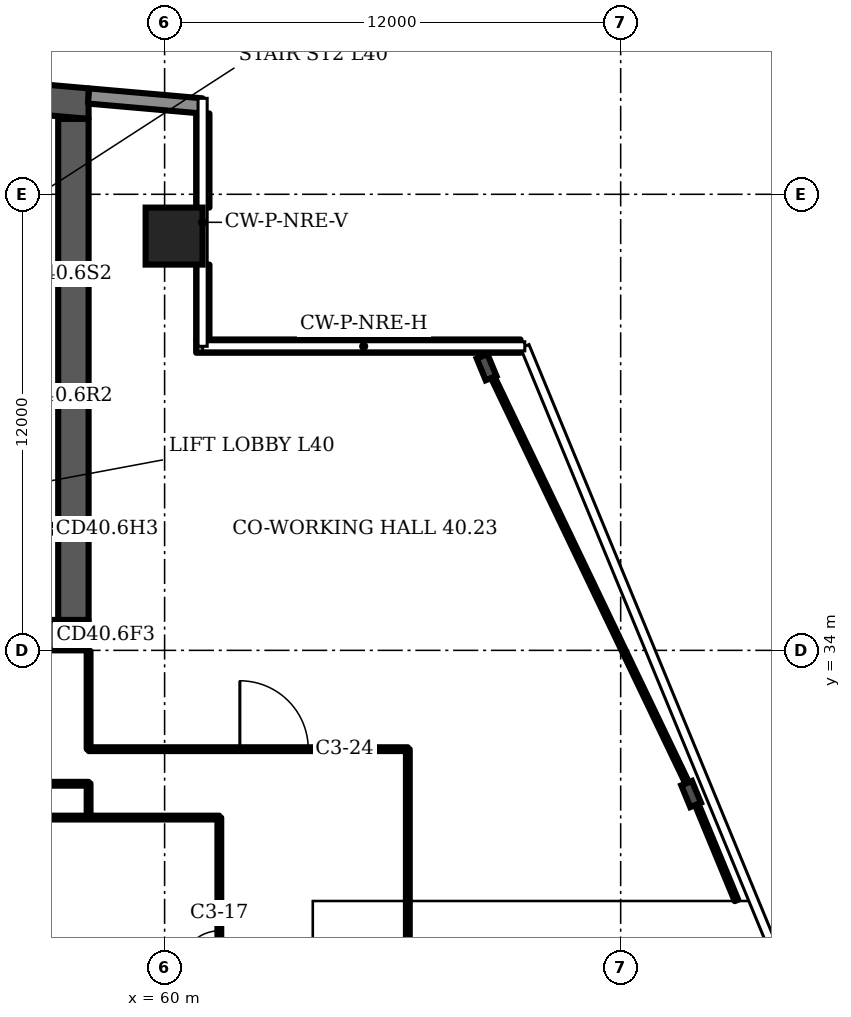
"""IFC4 building model, lengths in metres.
Left out: names, types, materials, properties, quantities, classifications, styles, units other than length and angle.
Written with IfcOpenShell. Run it as: python <this file> out.ifc"""

import sys

from ifc_helpers import new_model, si_unit, direction, frame, frame_2d, origin, origin_2d, place, context, subcontext, project, spatial, polyline, rectangle, i_section, outline, extrude, element, fill, save


model = new_model("IFC4")
c1 = context("Model", 3, precision=1e-05, world=origin(), true_north=direction((0.0, 1.0)))
c2 = subcontext(c1, "Body", "Model", "MODEL_VIEW")
j1 = project(units=[si_unit("LENGTHUNIT", "METRE"), si_unit("PLANEANGLEUNIT", "RADIAN")], contexts=[c1])
p1 = place(None, origin())
s1 = spatial("IfcSite", under=j1, at=p1, CompositionType="ELEMENT")
p2 = place(p1, origin())
s2 = spatial("IfcBuilding", under=s1, at=p2, CompositionType="ELEMENT")
p3 = place(p2, frame((0.0, 0.0, 166.3)))
s3 = spatial("IfcBuildingStorey", under=s2, at=p3, CompositionType="ELEMENT", Elevation=166.3)
p4 = place(p3, frame((0.0, 0.0, -0.0)))
e1 = element("IfcWall", 1, at=p4, inside=s3, PredefinedType="SHEAR", context=c2, shape_type="SweptSolid", body=[
    extrude(outline(polyline([(16.0, 47.984), (37.0, 49.822), (58.0, 47.984), (58.0, 48.787), (37.0, 50.625), (16.0, 48.787), (16.0, 47.984)])), origin(), (0.0, 0.0, 1.0), 3.6),
])
p5 = place(p3, frame((16.0, 34.4, 0.0), z_axis=(0.0, 0.0, 1.0), x_axis=(1.0, 0.0, 0.0)))
e2 = element("IfcWall", 2, at=p5, inside=s3, PredefinedType="SHEAR", context=c2, shape_type="SweptSolid", body=[
    extrude(rectangle(XDim=42.0, YDim=0.8, at=frame_2d((21.0, 0.0))), origin(), (0.0, 0.0, 1.0), 3.6),
])
p6 = place(p5, frame((3.2, 0.0, 0.0)))
e3 = element("IfcOpeningElement", 3, at=p6, cuts=e2, PredefinedType="OPENING", context=c2, shape_type="SweptSolid", body=[
    extrude(rectangle(XDim=1.0, YDim=2.1, at=frame_2d((0.5, 1.05))), frame((0.0, 0.41, 0.0), z_axis=(0.0, -1.0, 0.0), x_axis=(1.0, 0.0, 0.0)), (0.0, 0.0, 1.0), 0.82),
])
p7 = place(p5, frame((7.65, 0.0, 0.0)))
e4 = element("IfcOpeningElement", 4, at=p7, cuts=e2, PredefinedType="OPENING", context=c2, shape_type="SweptSolid", body=[
    extrude(rectangle(XDim=1.2, YDim=2.1, at=frame_2d((0.6, 1.05))), frame((0.0, 0.41, 0.0), z_axis=(0.0, -1.0, 0.0), x_axis=(1.0, 0.0, 0.0)), (0.0, 0.0, 1.0), 0.82),
])
p8 = place(p5, frame((14.767, 0.0, 0.0)))
e5 = element("IfcOpeningElement", 5, at=p8, cuts=e2, PredefinedType="OPENING", context=c2, shape_type="SweptSolid", body=[
    extrude(rectangle(XDim=1.1, YDim=2.1, at=frame_2d((0.55, 1.05))), frame((0.0, 0.41, 0.0), z_axis=(0.0, -1.0, 0.0), x_axis=(1.0, 0.0, 0.0)), (0.0, 0.0, 1.0), 0.82),
])
p9 = place(p5, frame((19.133, 0.0, 0.0)))
e6 = element("IfcOpeningElement", 6, at=p9, cuts=e2, PredefinedType="OPENING", context=c2, shape_type="SweptSolid", body=[
    extrude(rectangle(XDim=1.1, YDim=2.1, at=frame_2d((0.55, 1.05))), frame((0.0, 0.41, 0.0), z_axis=(0.0, -1.0, 0.0), x_axis=(1.0, 0.0, 0.0)), (0.0, 0.0, 1.0), 0.82),
])
p10 = place(p5, frame((16.8, 0.0, 0.0)))
e7 = element("IfcOpeningElement", 7, at=p10, cuts=e2, PredefinedType="OPENING", context=c2, shape_type="SweptSolid", body=[
    extrude(rectangle(XDim=1.4, YDim=2.1, at=frame_2d((0.7, 1.05))), frame((0.0, 0.41, 0.0), z_axis=(0.0, -1.0, 0.0), x_axis=(1.0, 0.0, 0.0)), (0.0, 0.0, 1.0), 0.82),
])
p11 = place(p5, frame((21.767, 0.0, 0.0)))
e8 = element("IfcOpeningElement", 8, at=p11, cuts=e2, PredefinedType="OPENING", context=c2, shape_type="SweptSolid", body=[
    extrude(rectangle(XDim=1.1, YDim=2.1, at=frame_2d((0.55, 1.05))), frame((0.0, 0.41, 0.0), z_axis=(0.0, -1.0, 0.0), x_axis=(1.0, 0.0, 0.0)), (0.0, 0.0, 1.0), 0.82),
])
p12 = place(p5, frame((23.95, 0.0, 0.0)))
e9 = element("IfcOpeningElement", 9, at=p12, cuts=e2, PredefinedType="OPENING", context=c2, shape_type="SweptSolid", body=[
    extrude(rectangle(XDim=1.1, YDim=2.1, at=frame_2d((0.55, 1.05))), frame((0.0, 0.41, 0.0), z_axis=(0.0, -1.0, 0.0), x_axis=(1.0, 0.0, 0.0)), (0.0, 0.0, 1.0), 0.82),
])
p13 = place(p5, frame((26.133, 0.0, 0.0)))
e10 = element("IfcOpeningElement", 10, at=p13, cuts=e2, PredefinedType="OPENING", context=c2, shape_type="SweptSolid", body=[
    extrude(rectangle(XDim=1.1, YDim=2.1, at=frame_2d((0.55, 1.05))), frame((0.0, 0.41, 0.0), z_axis=(0.0, -1.0, 0.0), x_axis=(1.0, 0.0, 0.0)), (0.0, 0.0, 1.0), 0.82),
])
p14 = place(p5, frame((33.15, 0.0, 0.0)))
e11 = element("IfcOpeningElement", 11, at=p14, cuts=e2, PredefinedType="OPENING", context=c2, shape_type="SweptSolid", body=[
    extrude(rectangle(XDim=1.2, YDim=2.1, at=frame_2d((0.6, 1.05))), frame((0.0, 0.41, 0.0), z_axis=(0.0, -1.0, 0.0), x_axis=(1.0, 0.0, 0.0)), (0.0, 0.0, 1.0), 0.82),
])
p15 = place(p5, frame((35.817, 0.0, 0.0)))
e12 = element("IfcOpeningElement", 12, at=p15, cuts=e2, PredefinedType="OPENING", context=c2, shape_type="SweptSolid", body=[
    extrude(rectangle(XDim=1.0, YDim=2.1, at=frame_2d((0.5, 1.05))), frame((0.0, 0.41, 0.0), z_axis=(0.0, -1.0, 0.0), x_axis=(1.0, 0.0, 0.0)), (0.0, 0.0, 1.0), 0.82),
])
p16 = place(p5, frame((39.95, 0.0, 0.0)))
e13 = element("IfcOpeningElement", 13, at=p16, cuts=e2, PredefinedType="OPENING", context=c2, shape_type="SweptSolid", body=[
    extrude(rectangle(XDim=1.0, YDim=2.1, at=frame_2d((0.5, 1.05))), frame((0.0, 0.41, 0.0), z_axis=(0.0, -1.0, 0.0), x_axis=(1.0, 0.0, 0.0)), (0.0, 0.0, 1.0), 0.82),
])
p17 = place(p5, frame((37.767, 0.0, 0.0)))
e14 = element("IfcOpeningElement", 14, at=p17, cuts=e2, PredefinedType="OPENING", context=c2, shape_type="SweptSolid", body=[
    extrude(rectangle(XDim=1.4, YDim=2.1, at=frame_2d((0.7, 1.05))), frame((0.0, 0.41, 0.0), z_axis=(0.0, -1.0, 0.0), x_axis=(1.0, 0.0, 0.0)), (0.0, 0.0, 1.0), 0.82),
])
p18 = place(p3, frame((57.6, 34.8, 0.0), z_axis=(0.0, 0.0, 1.0), x_axis=(0.0, 1.0, 0.0)))
e15 = element("IfcWall", 15, at=p18, inside=s3, PredefinedType="SHEAR", context=c2, shape_type="SweptSolid", body=[
    extrude(rectangle(XDim=13.184, YDim=0.8, at=frame_2d((6.592, 0.0))), origin(), (0.0, 0.0, 1.0), 3.6),
])
p19 = place(p3, frame((60.25, 44.9, 0.0), z_axis=(0.0, 0.0, 1.0), x_axis=(1.0, 0.0, 0.0)))
e16 = element("IfcColumn", 16, at=p19, inside=s3, PredefinedType="COLUMN", context=c2, shape_type="SweptSolid", body=[
    extrude(rectangle(XDim=1.5, YDim=1.5, at=origin_2d()), origin(), (0.0, 0.0, 1.0), 3.6),
])
for number, where, z_axis, x_axis in (
    (17, (73.854, 30.219, 0.0), (0.0, 0.0, 1.0), (0.924, 0.382, 0.0)),
    (18, (68.472, 41.45, 0.0), (0.0, 0.0, 1.0), (0.924, 0.382, 0.0)),
):
    element("IfcColumn", number, at=place(p3, frame(where, z_axis=z_axis, x_axis=x_axis)), inside=s3, PredefinedType="COLUMN", context=c2, shape_type="SweptSolid", body=[
        extrude(i_section(OverallWidth=0.305, OverallDepth=0.62, WebThickness=0.021, FlangeThickness=0.04, FilletRadius=0.027, at=origin_2d()), origin(), (0.0, 0.0, 1.0), 3.6),
    ])
p20 = place(p3, frame((60.983, 48.326, 0.0), z_axis=(0.0, 0.0, 1.0), x_axis=(-0.996194, 0.087168, 0.0)))
e19 = element("IfcWall", 19, at=p20, inside=s3, PredefinedType="SOLIDWALL", context=c2, shape_type="SweptSolid", body=[
    extrude(rectangle(XDim=2.994, YDim=0.4, at=frame_2d((1.497, 0.0))), origin(), (0.0, 0.0, 1.0), 3.2),
])
p21 = place(p3, frame((69.366, 42.005, 0.0), z_axis=(0.0, 0.0, 1.0), x_axis=(-1.0, 0.0, 0.0)))
e20 = element("IfcWall", 20, at=p21, inside=s3, PredefinedType="SOLIDWALL", context=c2, shape_type="SweptSolid", body=[
    extrude(rectangle(XDim=8.536, YDim=0.35, at=frame_2d((4.268, 0.0))), origin(), (0.0, 0.0, 1.0), 1.0),
])
p22 = place(p3, frame((61.005, 42.18, 0.0), z_axis=(0.0, 0.0, 1.0), x_axis=(0.0, 1.0, 0.0)))
e21 = element("IfcWall", 21, at=p22, inside=s3, PredefinedType="SOLIDWALL", context=c2, shape_type="SweptSolid", body=[
    extrude(rectangle(XDim=1.97, YDim=0.35, at=frame_2d((0.985, 0.0))), origin(), (0.0, 0.0, 1.0), 1.0),
])
p23 = place(p3, frame((61.005, 45.65, 0.0), z_axis=(0.0, 0.0, 1.0), x_axis=(0.0, 1.0, 0.0)))
e22 = element("IfcWall", 22, at=p23, inside=s3, PredefinedType="SOLIDWALL", context=c2, shape_type="SweptSolid", body=[
    extrude(rectangle(XDim=2.477, YDim=0.35, at=frame_2d((1.238, 0.0))), origin(), (0.0, 0.0, 1.0), 1.0),
])
p24 = place(p3, frame((55.7, 37.2, 0.0), z_axis=(0.0, 0.0, 1.0), x_axis=(1.0, 0.0, 0.0)))
e23 = element("IfcWall", 23, at=p24, inside=s3, PredefinedType="PARTITIONING", context=c2, shape_type="SweptSolid", body=[
    extrude(rectangle(XDim=1.5, YDim=0.2, at=frame_2d((0.75, 0.0))), origin(), (0.0, 0.0, 1.0), 3.2),
])
p25 = place(p24, frame((0.25, 0.0, 0.0)))
e24 = element("IfcOpeningElement", 24, at=p25, cuts=e23, PredefinedType="OPENING", context=c2, shape_type="SweptSolid", body=[
    extrude(rectangle(XDim=1.0, YDim=2.1, at=frame_2d((0.5, 1.05))), frame((0.0, 0.11, 0.0), z_axis=(0.0, -1.0, 0.0), x_axis=(1.0, 0.0, 0.0)), (0.0, 0.0, 1.0), 0.22),
])
p26 = place(p3, frame((51.4, 40.7, 0.0), z_axis=(0.0, 0.0, 1.0), x_axis=(1.0, 0.0, 0.0)))
e25 = element("IfcWall", 25, at=p26, inside=s3, PredefinedType="PARTITIONING", context=c2, shape_type="SweptSolid", body=[
    extrude(rectangle(XDim=5.8, YDim=0.2, at=frame_2d((2.9, 0.0))), origin(), (0.0, 0.0, 1.0), 3.2),
])
p27 = place(p26, frame((0.367, 0.0, 0.0)))
e26 = element("IfcOpeningElement", 26, at=p27, cuts=e25, PredefinedType="OPENING", context=c2, shape_type="SweptSolid", body=[
    extrude(rectangle(XDim=1.1, YDim=2.1, at=frame_2d((0.55, 1.05))), frame((0.0, 0.11, 0.0), z_axis=(0.0, -1.0, 0.0), x_axis=(1.0, 0.0, 0.0)), (0.0, 0.0, 1.0), 0.22),
])
p28 = place(p26, frame((3.417, 0.0, 0.0)))
e27 = element("IfcOpeningElement", 27, at=p28, cuts=e25, PredefinedType="OPENING", context=c2, shape_type="SweptSolid", body=[
    extrude(rectangle(XDim=1.0, YDim=2.1, at=frame_2d((0.5, 1.05))), frame((0.0, 0.11, 0.0), z_axis=(0.0, -1.0, 0.0), x_axis=(1.0, 0.0, 0.0)), (0.0, 0.0, 1.0), 0.22),
])
p29 = place(p3, frame((51.4, 43.9, 0.0), z_axis=(0.0, 0.0, 1.0), x_axis=(1.0, 0.0, 0.0)))
e28 = element("IfcWall", 28, at=p29, inside=s3, PredefinedType="PARTITIONING", context=c2, shape_type="SweptSolid", body=[
    extrude(rectangle(XDim=5.8, YDim=0.2, at=frame_2d((2.9, 0.0))), origin(), (0.0, 0.0, 1.0), 3.2),
])
p30 = place(p29, frame((3.417, 0.0, 0.0)))
e29 = element("IfcOpeningElement", 29, at=p30, cuts=e28, PredefinedType="OPENING", context=c2, shape_type="SweptSolid", body=[
    extrude(rectangle(XDim=1.0, YDim=2.1, at=frame_2d((0.5, 1.05))), frame((0.0, 0.11, 0.0), z_axis=(0.0, -1.0, 0.0), x_axis=(1.0, 0.0, 0.0)), (0.0, 0.0, 1.0), 0.22),
])
p31 = place(p3, frame((46.91, 30.49, 0.0), z_axis=(0.0, 0.0, 1.0), x_axis=(1.0, 0.0, 0.0)))
e30 = element("IfcWall", 30, at=p31, inside=s3, PredefinedType="PARTITIONING", context=c2, shape_type="SweptSolid", body=[
    extrude(rectangle(XDim=11.09, YDim=0.1, at=frame_2d((5.545, 0.0))), origin(), (0.0, 0.0, 1.0), 3.2),
])
p32 = place(p31, frame((0.235, 0.0, 0.0)))
e31 = element("IfcOpeningElement", 31, at=p32, cuts=e30, PredefinedType="OPENING", context=c2, shape_type="SweptSolid", body=[
    extrude(rectangle(XDim=1.1, YDim=2.1, at=frame_2d((0.55, 1.05))), frame((0.0, 0.06, 0.0), z_axis=(0.0, -1.0, 0.0), x_axis=(1.0, 0.0, 0.0)), (0.0, 0.0, 1.0), 0.12),
])
p33 = place(p3, frame((55.0, 29.6, 0.0), z_axis=(0.0, 0.0, 1.0), x_axis=(1.0, 0.0, 0.0)))
e32 = element("IfcWall", 32, at=p33, inside=s3, PredefinedType="PARTITIONING", context=c2, shape_type="SweptSolid", body=[
    extrude(rectangle(XDim=6.44, YDim=0.1, at=frame_2d((3.22, 0.0))), origin(), (0.0, 0.0, 1.0), 3.2),
])
p34 = place(p3, frame((58.0, 29.6, 0.0), z_axis=(0.0, 0.0, 1.0), x_axis=(0.0, 1.0, 0.0)))
e33 = element("IfcWall", 33, at=p34, inside=s3, PredefinedType="PARTITIONING", context=c2, shape_type="SweptSolid", body=[
    extrude(rectangle(XDim=0.9, YDim=0.1, at=frame_2d((0.45, 0.0))), origin(), (0.0, 0.0, 1.0), 3.2),
])
p35 = place(p3, frame((58.0, 31.4, 0.0), z_axis=(0.0, 0.0, 1.0), x_axis=(0.0, 1.0, 0.0)))
e34 = element("IfcWall", 34, at=p35, inside=s3, PredefinedType="PARTITIONING", context=c2, shape_type="SweptSolid", body=[
    extrude(rectangle(XDim=2.58, YDim=0.1, at=frame_2d((1.29, 0.0))), origin(), (0.0, 0.0, 1.0), 3.2),
])
p36 = place(p3, frame((58.0, 31.4, 0.0), z_axis=(0.0, 0.0, 1.0), x_axis=(1.0, 0.0, 0.0)))
e35 = element("IfcWall", 35, at=p36, inside=s3, PredefinedType="PARTITIONING", context=c2, shape_type="SweptSolid", body=[
    extrude(rectangle(XDim=8.4, YDim=0.1, at=frame_2d((4.2, 0.0))), origin(), (0.0, 0.0, 1.0), 3.2),
])
p37 = place(p36, frame((3.98, 0.0, 0.0)))
e36 = element("IfcOpeningElement", 36, at=p37, cuts=e35, PredefinedType="OPENING", context=c2, shape_type="SweptSolid", body=[
    extrude(rectangle(XDim=1.8, YDim=2.1, at=frame_2d((0.9, 1.05))), frame((0.0, 0.06, 0.0), z_axis=(0.0, -1.0, 0.0), x_axis=(1.0, 0.0, 0.0)), (0.0, 0.0, 1.0), 0.12),
])
p38 = place(p3, frame((61.44, 24.8, 0.0), z_axis=(0.0, 0.0, 1.0), x_axis=(0.0, 1.0, 0.0)))
e37 = element("IfcWall", 37, at=p38, inside=s3, PredefinedType="PARTITIONING", context=c2, shape_type="SweptSolid", body=[
    extrude(rectangle(XDim=4.8, YDim=0.1, at=frame_2d((2.4, 0.0))), origin(), (0.0, 0.0, 1.0), 3.2),
])
p39 = place(p38, frame((0.82, 0.0, 0.0)))
e38 = element("IfcOpeningElement", 38, at=p39, cuts=e37, PredefinedType="OPENING", context=c2, shape_type="SweptSolid", body=[
    extrude(rectangle(XDim=1.0, YDim=2.1, at=frame_2d((0.5, 1.05))), frame((0.0, 0.06, 0.0), z_axis=(0.0, -1.0, 0.0), x_axis=(1.0, 0.0, 0.0)), (0.0, 0.0, 1.0), 0.12),
])
p40 = place(p3, frame((66.4, 26.075, 0.0), z_axis=(0.0, 0.0, 1.0), x_axis=(0.0, 1.0, 0.0)))
e39 = element("IfcWall", 39, at=p40, inside=s3, PredefinedType="PARTITIONING", context=c2, shape_type="SweptSolid", body=[
    extrude(rectangle(XDim=5.325, YDim=0.1, at=frame_2d((2.663, 0.0))), origin(), (0.0, 0.0, 1.0), 3.2),
])
p41 = place(p3, frame((73.885, 30.23, 0.0), z_axis=(0.0, 0.0, 1.0), x_axis=(-0.432129, 0.901808, 0.0)))
e40 = element("IfcWall", 40, at=p41, inside=s3, PredefinedType="PARTITIONING", context=c2, shape_type="SweptSolid", body=[
    extrude(rectangle(XDim=13.029, YDim=0.1, at=frame_2d((6.515, 0.0))), origin(), (0.0, 0.0, 1.0), 2.58),
])
p42 = place(p3, frame((75.047, 27.42, 0.0), z_axis=(0.0, 0.0, 1.0), x_axis=(-0.382024, 0.924148, 0.0)))
e41 = element("IfcWall", 41, at=p42, inside=s3, PredefinedType="PARTITIONING", context=c2, shape_type="SweptSolid", body=[
    extrude(rectangle(XDim=3.041, YDim=0.1, at=frame_2d((1.521, 0.0))), origin(), (0.0, 0.0, 1.0), 2.58),
])
p43 = place(p39, origin())
e42 = element("IfcDoor", 42, at=p43, inside=s3, OperationType="SINGLE_SWING_LEFT", PredefinedType="DOOR", context=c2, shape_type="SweptSolid", body=[
    extrude(rectangle(XDim=1.0, YDim=2.1, at=frame_2d((0.5, 1.05))), frame((0.0, 0.025, 0.0), z_axis=(0.0, -1.0, 0.0), x_axis=(1.0, 0.0, 0.0)), (0.0, 0.0, 1.0), 0.05),
])
fill(e38, e42)
p44 = place(p37, origin())
e43 = element("IfcDoor", 43, at=p44, inside=s3, OperationType="DOUBLE_DOOR_SINGLE_SWING", PredefinedType="DOOR", context=c2, shape_type="SweptSolid", body=[
    extrude(rectangle(XDim=1.8, YDim=2.1, at=frame_2d((0.9, 1.05))), frame((0.0, 0.025, 0.0), z_axis=(0.0, -1.0, 0.0), x_axis=(1.0, 0.0, 0.0)), (0.0, 0.0, 1.0), 0.05),
])
fill(e36, e43)
save(model, sys.argv[1])
